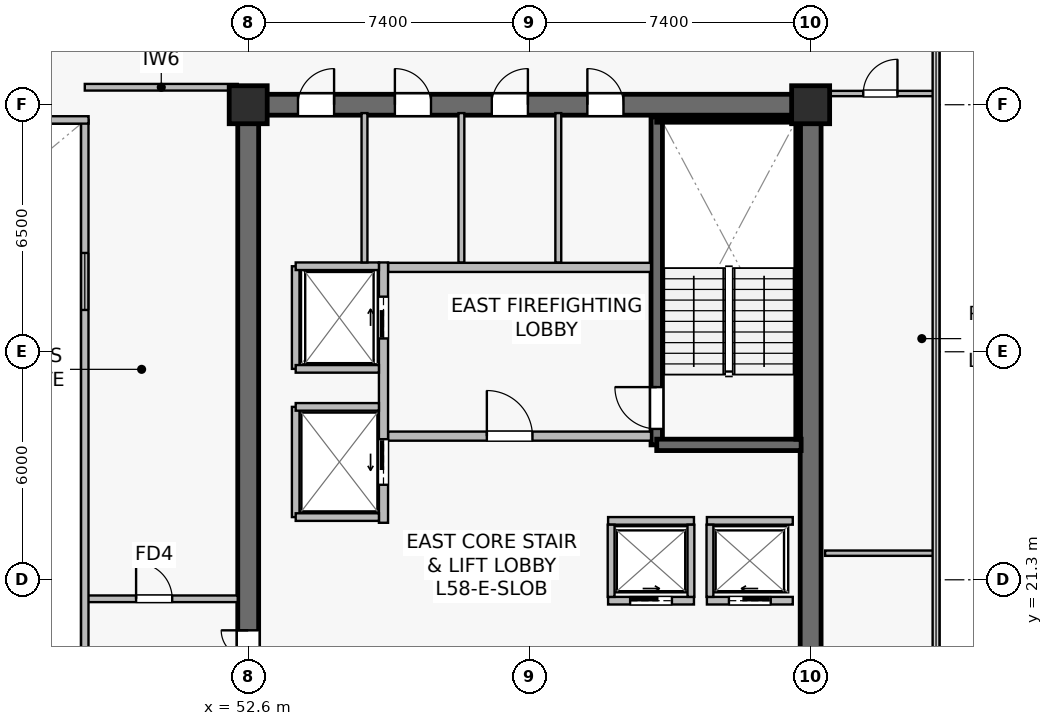
"""IFC4 building model, lengths in metres.
Left out: names, types, materials, properties, quantities, classifications, styles, units other than length and angle.
Written with IfcOpenShell. Run it as: python <this file> out.ifc"""

import sys

from ifc_helpers import new_model, si_unit, direction, frame, frame_2d, origin, origin_2d, place, context, subcontext, project, spatial, rectangle, extrude, source, transform, mapped, element, fill, save


model = new_model("IFC4")
c1 = context("Model", 3, precision=1e-05, world=origin(), true_north=direction((0.0, 1.0)))
c2 = subcontext(c1, "Body", "Model", "MODEL_VIEW")
j1 = project(units=[si_unit("LENGTHUNIT", "METRE"), si_unit("PLANEANGLEUNIT", "RADIAN")], contexts=[c1])
p1 = place(None, origin())
s1 = spatial("IfcSite", under=j1, at=p1, CompositionType="ELEMENT")
p2 = place(p1, origin())
s2 = spatial("IfcBuilding", under=s1, at=p2, CompositionType="ELEMENT")
p3 = place(p2, frame((0.0, 0.0, 242.4)))
s3 = spatial("IfcBuildingStorey", under=s2, at=p3, CompositionType="ELEMENT", Elevation=242.4)
p4 = place(p3, frame((52.325, 33.8, 0.0), z_axis=(0.0, 0.0, 1.0), x_axis=(1.0, 0.0, 0.0)))
e1 = element("IfcWall", 1, at=p4, inside=s3, PredefinedType="SHEAR", context=c2, shape_type="SweptSolid", body=[
    extrude(rectangle(XDim=15.35, YDim=0.55, at=frame_2d((7.675, 0.0))), origin(), (0.0, 0.0, 1.0), 3.8),
])
p5 = place(p4, frame((9.2, 0.0, 0.0)))
e2 = element("IfcOpeningElement", 2, at=p5, cuts=e1, PredefinedType="OPENING", context=c2, shape_type="SweptSolid", body=[
    extrude(rectangle(XDim=0.95, YDim=2.15, at=frame_2d((0.475, 1.075))), frame((0.0, 0.285, 0.0), z_axis=(0.0, -1.0, 0.0), x_axis=(1.0, 0.0, 0.0)), (0.0, 0.0, 1.0), 0.57),
])
p6 = place(p4, frame((6.685, 0.0, 0.0)))
e3 = element("IfcOpeningElement", 3, at=p6, cuts=e1, PredefinedType="OPENING", context=c2, shape_type="SweptSolid", body=[
    extrude(rectangle(XDim=0.95, YDim=2.15, at=frame_2d((0.475, 1.075))), frame((0.0, 0.285, 0.0), z_axis=(0.0, -1.0, 0.0), x_axis=(1.0, 0.0, 0.0)), (0.0, 0.0, 1.0), 0.57),
])
p7 = place(p4, frame((4.135, 0.0, 0.0)))
e4 = element("IfcOpeningElement", 4, at=p7, cuts=e1, PredefinedType="OPENING", context=c2, shape_type="SweptSolid", body=[
    extrude(rectangle(XDim=0.95, YDim=2.15, at=frame_2d((0.475, 1.075))), frame((0.0, 0.285, 0.0), z_axis=(0.0, -1.0, 0.0), x_axis=(1.0, 0.0, 0.0)), (0.0, 0.0, 1.0), 0.57),
])
p8 = place(p4, frame((1.585, 0.0, 0.0)))
e5 = element("IfcOpeningElement", 5, at=p8, cuts=e1, PredefinedType="OPENING", context=c2, shape_type="SweptSolid", body=[
    extrude(rectangle(XDim=0.95, YDim=2.15, at=frame_2d((0.475, 1.075))), frame((0.0, 0.285, 0.0), z_axis=(0.0, -1.0, 0.0), x_axis=(1.0, 0.0, 0.0)), (0.0, 0.0, 1.0), 0.57),
])
p9 = place(p3, frame((52.6, 15.075, 0.0), z_axis=(0.0, 0.0, 1.0), x_axis=(0.0, 1.0, 0.0)))
e6 = element("IfcWall", 6, at=p9, inside=s3, PredefinedType="SHEAR", context=c2, shape_type="SweptSolid", body=[
    extrude(rectangle(XDim=18.45, YDim=0.55, at=frame_2d((9.225, 0.0))), origin(), (0.0, 0.0, 1.0), 3.8),
])
p10 = place(p9, frame((3.475, 0.0, 0.0)))
e7 = element("IfcOpeningElement", 7, at=p10, cuts=e6, PredefinedType="OPENING", context=c2, shape_type="SweptSolid", body=[
    extrude(rectangle(XDim=1.42, YDim=2.2, at=frame_2d((0.71, 1.1))), frame((0.0, 0.285, 0.0), z_axis=(0.0, -1.0, 0.0), x_axis=(1.0, 0.0, 0.0)), (0.0, 0.0, 1.0), 0.57),
])
p11 = place(p3, frame((67.4, 15.075, 0.0), z_axis=(0.0, 0.0, 1.0), x_axis=(0.0, 1.0, 0.0)))
e8 = element("IfcWall", 8, at=p11, inside=s3, PredefinedType="SHEAR", context=c2, shape_type="SweptSolid", body=[
    extrude(rectangle(XDim=18.45, YDim=0.55, at=frame_2d((9.225, 0.0))), origin(), (0.0, 0.0, 1.0), 3.8),
])
p12 = place(p3, frame((63.35, 24.85, 0.0), z_axis=(0.0, 0.0, 1.0), x_axis=(0.0, 1.0, 0.0)))
e9 = element("IfcWall", 9, at=p12, inside=s3, PredefinedType="SHEAR", context=c2, shape_type="SweptSolid", body=[
    extrude(rectangle(XDim=8.63, YDim=0.3, at=frame_2d((4.315, 0.0))), origin(), (0.0, 0.0, 1.0), 3.8),
])
p13 = place(p12, frame((0.42, 0.0, 0.0)))
e10 = element("IfcOpeningElement", 10, at=p13, cuts=e9, PredefinedType="OPENING", context=c2, shape_type="SweptSolid", body=[
    extrude(rectangle(XDim=1.1, YDim=2.15, at=frame_2d((0.55, 1.075))), frame((0.0, 0.16, 0.0), z_axis=(0.0, -1.0, 0.0), x_axis=(1.0, 0.0, 0.0)), (0.0, 0.0, 1.0), 0.32),
])
p14 = place(p3, frame((63.35, 24.85, 0.0), z_axis=(0.0, 0.0, 1.0), x_axis=(1.0, 0.0, 0.0)))
e11 = element("IfcWall", 11, at=p14, inside=s3, PredefinedType="SHEAR", context=c2, shape_type="SweptSolid", body=[
    extrude(rectangle(XDim=3.8, YDim=0.3, at=frame_2d((1.9, 0.0))), origin(), (0.0, 0.0, 1.0), 3.8),
])
p15 = place(p3, frame((63.35, 33.4, 0.0), z_axis=(0.0, 0.0, 1.0), x_axis=(1.0, 0.0, 0.0)))
e12 = element("IfcWall", 12, at=p15, inside=s3, PredefinedType="SOLIDWALL", context=c2, shape_type="SweptSolid", body=[
    extrude(rectangle(XDim=3.72, YDim=0.12, at=frame_2d((1.86, 0.0))), origin(), (0.0, 0.0, 1.0), 3.8),
])
p16 = place(p3, frame((67.07, 25.0, 0.0), z_axis=(0.0, 0.0, 1.0), x_axis=(0.0, 1.0, 0.0)))
e13 = element("IfcWall", 13, at=p16, inside=s3, PredefinedType="SOLIDWALL", context=c2, shape_type="SweptSolid", body=[
    extrude(rectangle(XDim=8.32, YDim=0.12, at=frame_2d((4.16, 0.0))), origin(), (0.0, 0.0, 1.0), 3.8),
])
m1 = source(origin(), c2, "Body", "SweptSolid", [
    extrude(rectangle(XDim=1.0, YDim=1.0, at=origin_2d()), origin(), (0.0, 0.0, 1.0), 4.1),
])
for number, where, z_axis, x_axis in (
    (14, (52.6, 33.8, 0.0), (0.0, 0.0, 1.0), (1.0, 0.0, 0.0)),
    (15, (67.4, 33.8, 0.0), (0.0, 0.0, 1.0), (1.0, 0.0, 0.0)),
):
    element("IfcColumn", number, at=place(p3, frame(where, z_axis=z_axis, x_axis=x_axis)), inside=s3, PredefinedType="COLUMN", context=c2, shape_type="MappedRepresentation", body=[
        mapped(m1, transform((0.0, 0.0, 0.0), scale=1.0)),
    ])
p17 = place(p3, frame((56.28, 25.08, 0.0), z_axis=(0.0, 0.0, 1.0), x_axis=(1.0, 0.0, 0.0)))
e16 = element("IfcWall", 16, at=p17, inside=s3, PredefinedType="SOLIDWALL", context=c2, shape_type="SweptSolid", body=[
    extrude(rectangle(XDim=6.92, YDim=0.24, at=frame_2d((3.46, 0.0))), origin(), (0.0, 0.0, 1.0), 3.197),
])
p18 = place(p17, frame((2.6, 0.0, 0.0)))
e17 = element("IfcOpeningElement", 17, at=p18, cuts=e16, PredefinedType="OPENING", context=c2, shape_type="SweptSolid", body=[
    extrude(rectangle(XDim=1.2, YDim=2.16, at=frame_2d((0.6, 1.08))), frame((0.0, 0.13, 0.0), z_axis=(0.0, -1.0, 0.0), x_axis=(1.0, 0.0, 0.0)), (0.0, 0.0, 1.0), 0.26),
])
p19 = place(p3, frame((56.28, 29.52, 0.0), z_axis=(0.0, 0.0, 1.0), x_axis=(1.0, 0.0, 0.0)))
e18 = element("IfcWall", 18, at=p19, inside=s3, PredefinedType="SOLIDWALL", context=c2, shape_type="SweptSolid", body=[
    extrude(rectangle(XDim=6.92, YDim=0.24, at=frame_2d((3.46, 0.0))), origin(), (0.0, 0.0, 1.0), 3.197),
])
p20 = place(p3, frame((56.16, 22.8, 0.0), z_axis=(0.0, 0.0, 1.0), x_axis=(0.0, 1.0, 0.0)))
e19 = element("IfcWall", 19, at=p20, inside=s3, PredefinedType="SOLIDWALL", context=c2, shape_type="SweptSolid", body=[
    extrude(rectangle(XDim=6.85, YDim=0.24, at=frame_2d((3.425, 0.0))), origin(), (0.0, 0.0, 1.0), 2.935),
])
p21 = place(p20, frame((4.85, 0.0, 0.0)))
e20 = element("IfcOpeningElement", 20, at=p21, cuts=e19, PredefinedType="OPENING", context=c2, shape_type="SweptSolid", body=[
    extrude(rectangle(XDim=1.1, YDim=2.22, at=frame_2d((0.55, 1.11))), frame((0.0, 0.13, 0.0), z_axis=(0.0, -1.0, 0.0), x_axis=(1.0, 0.0, 0.0)), (0.0, 0.0, 1.0), 0.26),
])
p22 = place(p20, frame((1.0, 0.0, 0.0)))
e21 = element("IfcOpeningElement", 21, at=p22, cuts=e19, PredefinedType="OPENING", context=c2, shape_type="SweptSolid", body=[
    extrude(rectangle(XDim=1.2, YDim=2.22, at=frame_2d((0.6, 1.11))), frame((0.0, 0.13, 0.0), z_axis=(0.0, -1.0, 0.0), x_axis=(1.0, 0.0, 0.0)), (0.0, 0.0, 1.0), 0.26),
])
p23 = place(p3, frame((64.67, 20.75, 0.0), z_axis=(0.0, 0.0, 1.0), x_axis=(1.0, 0.0, 0.0)))
e22 = element("IfcWall", 22, at=p23, inside=s3, PredefinedType="SOLIDWALL", context=c2, shape_type="SweptSolid", body=[
    extrude(rectangle(XDim=2.26, YDim=0.2, at=frame_2d((1.13, 0.0))), origin(), (0.0, 0.0, 1.0), 3.8),
])
p24 = place(p23, frame((0.58, 0.0, 0.0)))
e23 = element("IfcOpeningElement", 23, at=p24, cuts=e22, PredefinedType="OPENING", context=c2, shape_type="SweptSolid", body=[
    extrude(rectangle(XDim=1.1, YDim=2.22, at=frame_2d((0.55, 1.11))), frame((0.0, 0.11, 0.0), z_axis=(0.0, -1.0, 0.0), x_axis=(1.0, 0.0, 0.0)), (0.0, 0.0, 1.0), 0.22),
])
p25 = place(p3, frame((64.67, 22.85, 0.0), z_axis=(0.0, 0.0, 1.0), x_axis=(1.0, 0.0, 0.0)))
e24 = element("IfcWall", 24, at=p25, inside=s3, PredefinedType="SOLIDWALL", context=c2, shape_type="SweptSolid", body=[
    extrude(rectangle(XDim=2.26, YDim=0.2, at=frame_2d((1.13, 0.0))), origin(), (0.0, 0.0, 1.0), 3.8),
])
p26 = place(p3, frame((64.75, 20.85, 0.0), z_axis=(0.0, 0.0, 1.0), x_axis=(0.0, 1.0, 0.0)))
e25 = element("IfcWall", 25, at=p26, inside=s3, PredefinedType="SOLIDWALL", context=c2, shape_type="SweptSolid", body=[
    extrude(rectangle(XDim=1.9, YDim=0.18, at=frame_2d((0.95, 0.0))), origin(), (0.0, 0.0, 1.0), 3.8),
])
p27 = place(p3, frame((62.07, 20.75, 0.0), z_axis=(0.0, 0.0, 1.0), x_axis=(1.0, 0.0, 0.0)))
e26 = element("IfcWall", 26, at=p27, inside=s3, PredefinedType="SOLIDWALL", context=c2, shape_type="SweptSolid", body=[
    extrude(rectangle(XDim=2.26, YDim=0.2, at=frame_2d((1.13, 0.0))), origin(), (0.0, 0.0, 1.0), 3.8),
])
p28 = place(p27, frame((0.58, 0.0, 0.0)))
e27 = element("IfcOpeningElement", 27, at=p28, cuts=e26, PredefinedType="OPENING", context=c2, shape_type="SweptSolid", body=[
    extrude(rectangle(XDim=1.1, YDim=2.22, at=frame_2d((0.55, 1.11))), frame((0.0, 0.11, 0.0), z_axis=(0.0, -1.0, 0.0), x_axis=(1.0, 0.0, 0.0)), (0.0, 0.0, 1.0), 0.22),
])
p29 = place(p3, frame((62.07, 22.85, 0.0), z_axis=(0.0, 0.0, 1.0), x_axis=(1.0, 0.0, 0.0)))
e28 = element("IfcWall", 28, at=p29, inside=s3, PredefinedType="SOLIDWALL", context=c2, shape_type="SweptSolid", body=[
    extrude(rectangle(XDim=2.26, YDim=0.2, at=frame_2d((1.13, 0.0))), origin(), (0.0, 0.0, 1.0), 3.8),
])
for number, where, z_axis, x_axis in (
    (29, (62.15, 20.85, 0.0), (0.0, 0.0, 1.0), (0.0, 1.0, 0.0)),
    (30, (64.25, 20.85, 0.0), (0.0, 0.0, 1.0), (0.0, 1.0, 0.0)),
):
    element("IfcWall", number, at=place(p3, frame(where, z_axis=z_axis, x_axis=x_axis)), inside=s3, PredefinedType="SOLIDWALL", context=c2, shape_type="SweptSolid", body=[
        extrude(rectangle(XDim=1.9, YDim=0.18, at=frame_2d((0.95, 0.0))), origin(), (0.0, 0.0, 1.0), 3.8),
    ])
p30 = place(p3, frame((53.85, 26.85, 0.0), z_axis=(0.0, 0.0, 1.0), x_axis=(0.0, 1.0, 0.0)))
e31 = element("IfcWall", 31, at=p30, inside=s3, PredefinedType="SOLIDWALL", context=c2, shape_type="SweptSolid", body=[
    extrude(rectangle(XDim=2.7, YDim=0.2, at=frame_2d((1.35, 0.0))), origin(), (0.0, 0.0, 1.0), 3.8),
])
p31 = place(p3, frame((53.85, 29.55, 0.0), z_axis=(0.0, 0.0, 1.0), x_axis=(1.0, 0.0, 0.0)))
e32 = element("IfcWall", 32, at=p31, inside=s3, PredefinedType="SOLIDWALL", context=c2, shape_type="SweptSolid", body=[
    extrude(rectangle(XDim=2.19, YDim=0.2, at=frame_2d((1.095, 0.0))), origin(), (0.0, 0.0, 1.0), 3.8),
])
p32 = place(p3, frame((53.85, 26.85, 0.0), z_axis=(0.0, 0.0, 1.0), x_axis=(1.0, 0.0, 0.0)))
e33 = element("IfcWall", 33, at=p32, inside=s3, PredefinedType="SOLIDWALL", context=c2, shape_type="SweptSolid", body=[
    extrude(rectangle(XDim=2.19, YDim=0.2, at=frame_2d((1.095, 0.0))), origin(), (0.0, 0.0, 1.0), 3.197),
])
p33 = place(p3, frame((53.85, 22.95, 0.0), z_axis=(0.0, 0.0, 1.0), x_axis=(0.0, 1.0, 0.0)))
e34 = element("IfcWall", 34, at=p33, inside=s3, PredefinedType="SOLIDWALL", context=c2, shape_type="SweptSolid", body=[
    extrude(rectangle(XDim=2.9, YDim=0.2, at=frame_2d((1.45, 0.0))), origin(), (0.0, 0.0, 1.0), 2.935),
])
for number, where, z_axis, x_axis in (
    (35, (53.85, 25.85, 0.0), (0.0, 0.0, 1.0), (1.0, 0.0, 0.0)),
    (36, (53.85, 22.95, 0.0), (0.0, 0.0, 1.0), (1.0, 0.0, 0.0)),
):
    element("IfcWall", number, at=place(p3, frame(where, z_axis=z_axis, x_axis=x_axis)), inside=s3, PredefinedType="SOLIDWALL", context=c2, shape_type="SweptSolid", body=[
        extrude(rectangle(XDim=2.19, YDim=0.2, at=frame_2d((1.095, 0.0))), origin(), (0.0, 0.0, 1.0), 3.8),
    ])
for number, where, z_axis, x_axis in (
    (37, (60.76, 29.65, 0.0), (0.0, 0.0, 1.0), (0.0, 1.0, 0.0)),
    (38, (58.21, 29.65, 0.0), (0.0, 0.0, 1.0), (0.0, 1.0, 0.0)),
    (39, (55.66, 29.65, 0.0), (0.0, 0.0, 1.0), (0.0, 1.0, 0.0)),
):
    element("IfcWall", number, at=place(p3, frame(where, z_axis=z_axis, x_axis=x_axis)), inside=s3, PredefinedType="PLUMBINGWALL", context=c2, shape_type="SweptSolid", body=[
        extrude(rectangle(XDim=3.93, YDim=0.155, at=frame_2d((1.965, 0.0))), origin(), (0.0, 0.0, 1.0), 3.8),
    ])
p34 = place(p3, frame((48.3, 34.26, 0.0), z_axis=(0.0, 0.0, 1.0), x_axis=(1.0, 0.0, 0.0)))
e40 = element("IfcWall", 40, at=p34, inside=s3, PredefinedType="PARTITIONING", context=c2, shape_type="SweptSolid", body=[
    extrude(rectangle(XDim=4.025, YDim=0.175, at=frame_2d((2.012, 0.0))), origin(), (0.0, 0.0, 1.0), 3.485),
])
p35 = place(p3, frame((48.3, 20.8, 0.0), z_axis=(0.0, 0.0, 1.0), x_axis=(1.0, 0.0, 0.0)))
e41 = element("IfcWall", 41, at=p35, inside=s3, PredefinedType="PARTITIONING", context=c2, shape_type="SweptSolid", body=[
    extrude(rectangle(XDim=4.025, YDim=0.175, at=frame_2d((2.012, 0.0))), origin(), (0.0, 0.0, 1.0), 3.8),
])
p36 = place(p35, frame((1.35, 0.0, 0.0)))
e42 = element("IfcOpeningElement", 42, at=p36, cuts=e41, PredefinedType="OPENING", context=c2, shape_type="SweptSolid", body=[
    extrude(rectangle(XDim=0.95, YDim=2.15, at=frame_2d((0.475, 1.075))), frame((0.0, 0.098, 0.0), z_axis=(0.0, -1.0, 0.0), x_axis=(1.0, 0.0, 0.0)), (0.0, 0.0, 1.0), 0.195),
])
p37 = place(p3, frame((48.3, 15.2, 0.0), z_axis=(0.0, 0.0, 1.0), x_axis=(0.0, 1.0, 0.0)))
e43 = element("IfcWall", 43, at=p37, inside=s3, PredefinedType="SOLIDWALL", context=c2, shape_type="SweptSolid", body=[
    extrude(rectangle(XDim=18.2, YDim=0.195, at=frame_2d((9.1, 0.0))), origin(), (0.0, 0.0, 1.0), 3.8),
])
p38 = place(p37, frame((1.8, 0.0, 0.9)))
e44 = element("IfcOpeningElement", 44, at=p38, cuts=e43, PredefinedType="OPENING", context=c2, shape_type="SweptSolid", body=[
    extrude(rectangle(XDim=1.5, YDim=1.4, at=frame_2d((0.75, 0.7))), frame((0.0, 0.107, 0.0), z_axis=(0.0, -1.0, 0.0), x_axis=(1.0, 0.0, 0.0)), (0.0, 0.0, 1.0), 0.215),
])
p39 = place(p37, frame((13.2, 0.0, 0.9)))
e45 = element("IfcOpeningElement", 45, at=p39, cuts=e43, PredefinedType="OPENING", context=c2, shape_type="SweptSolid", body=[
    extrude(rectangle(XDim=1.5, YDim=1.4, at=frame_2d((0.75, 0.7))), frame((0.0, 0.107, 0.0), z_axis=(0.0, -1.0, 0.0), x_axis=(1.0, 0.0, 0.0)), (0.0, 0.0, 1.0), 0.215),
])
p40 = place(p3, frame((26.4, 33.4, 0.0), z_axis=(0.0, 0.0, 1.0), x_axis=(1.0, 0.0, 0.0)))
e46 = element("IfcWall", 46, at=p40, inside=s3, PredefinedType="SOLIDWALL", context=c2, shape_type="SweptSolid", body=[
    extrude(rectangle(XDim=22.0, YDim=0.195, at=frame_2d((11.0, 0.0))), origin(), (0.0, 0.0, 1.0), 3.8),
])
p41 = place(p3, frame((67.78, 22.0, 0.0), z_axis=(0.0, 0.0, 1.0), x_axis=(1.0, 0.0, 0.0)))
e47 = element("IfcWall", 47, at=p41, inside=s3, PredefinedType="PARTITIONING", context=c2, shape_type="SweptSolid", body=[
    extrude(rectangle(XDim=2.91, YDim=0.14, at=frame_2d((1.455, 0.0))), origin(), (0.0, 0.0, 1.0), 3.8),
])
p42 = place(p3, frame((67.78, 34.095, 0.0), z_axis=(0.0, 0.0, 1.0), x_axis=(1.0, 0.0, 0.0)))
e48 = element("IfcWall", 48, at=p42, inside=s3, PredefinedType="PARTITIONING", context=c2, shape_type="SweptSolid", body=[
    extrude(rectangle(XDim=2.91, YDim=0.14, at=frame_2d((1.455, 0.0))), origin(), (0.0, 0.0, 1.0), 3.8),
])
p43 = place(p42, frame((1.005, 0.0, 0.0)))
e49 = element("IfcOpeningElement", 49, at=p43, cuts=e48, PredefinedType="OPENING", context=c2, shape_type="SweptSolid", body=[
    extrude(rectangle(XDim=0.9, YDim=2.1, at=frame_2d((0.45, 1.05))), frame((0.0, 0.08, 0.0), z_axis=(0.0, -1.0, 0.0), x_axis=(1.0, 0.0, 0.0)), (0.0, 0.0, 1.0), 0.16),
])
m2 = source(origin(), c2, "Body", "SweptSolid", [
    extrude(rectangle(XDim=1.5, YDim=1.4, at=frame_2d((0.75, 0.7))), frame((0.0, 0.03, 0.0), z_axis=(0.0, -1.0, 0.0), x_axis=(1.0, 0.0, 0.0)), (0.0, 0.0, 1.0), 0.06),
])
p44 = place(p39, origin())
e50 = element("IfcWindow", 50, at=p44, inside=s3, PartitioningType="SINGLE_PANEL", PredefinedType="WINDOW", context=c2, shape_type="MappedRepresentation", body=[
    mapped(m2, transform((0.0, 0.0, 0.0), scale=1.0)),
])
fill(e45, e50)
m3 = source(origin(), c2, "Body", "SweptSolid", [
    extrude(rectangle(XDim=1.1, YDim=2.15, at=frame_2d((0.55, 1.075))), frame((0.0, 0.025, 0.0), z_axis=(0.0, -1.0, 0.0), x_axis=(1.0, 0.0, 0.0)), (0.0, 0.0, 1.0), 0.05),
])
p45 = place(p13, origin())
e51 = element("IfcDoor", 51, at=p45, inside=s3, OperationType="SINGLE_SWING_RIGHT", PredefinedType="DOOR", context=c2, shape_type="MappedRepresentation", body=[
    mapped(m3, transform((0.0, 0.0, 0.0), scale=1.0)),
])
fill(e10, e51)
m4 = source(origin(), c2, "Body", "SweptSolid", [
    extrude(rectangle(XDim=1.2, YDim=2.16, at=frame_2d((0.6, 1.08))), frame((0.0, 0.025, 0.0), z_axis=(0.0, -1.0, 0.0), x_axis=(1.0, 0.0, 0.0)), (0.0, 0.0, 1.0), 0.05),
])
p46 = place(p18, origin())
e52 = element("IfcDoor", 52, at=p46, inside=s3, OperationType="SINGLE_SWING_LEFT", PredefinedType="DOOR", context=c2, shape_type="MappedRepresentation", body=[
    mapped(m4, transform((0.0, 0.0, 0.0), scale=1.0)),
])
fill(e17, e52)
m5 = source(origin(), c2, "Body", "SweptSolid", [
    extrude(rectangle(XDim=1.1, YDim=2.22, at=frame_2d((0.55, 1.11))), frame((0.0, 0.025, 0.0), z_axis=(0.0, -1.0, 0.0), x_axis=(1.0, 0.0, 0.0)), (0.0, 0.0, 1.0), 0.05),
])
p47 = place(p24, origin())
e53 = element("IfcDoor", 53, at=p47, inside=s3, OperationType="SLIDING_TO_LEFT", PredefinedType="USERDEFINED", context=c2, shape_type="MappedRepresentation", body=[
    mapped(m5, transform((0.0, 0.0, 0.0), scale=1.0)),
])
fill(e23, e53)
p48 = place(p28, origin())
e54 = element("IfcDoor", 54, at=p48, inside=s3, OperationType="SLIDING_TO_RIGHT", PredefinedType="USERDEFINED", context=c2, shape_type="MappedRepresentation", body=[
    mapped(m5, transform((0.0, 0.0, 0.0), scale=1.0)),
])
fill(e27, e54)
p49 = place(p21, origin())
e55 = element("IfcDoor", 55, at=p49, inside=s3, OperationType="SLIDING_TO_RIGHT", PredefinedType="USERDEFINED", context=c2, shape_type="MappedRepresentation", body=[
    mapped(m5, transform((0.0, 0.0, 0.0), scale=1.0)),
])
fill(e20, e55)
m6 = source(origin(), c2, "Body", "SweptSolid", [
    extrude(rectangle(XDim=1.2, YDim=2.22, at=frame_2d((0.6, 1.11))), frame((0.0, 0.025, 0.0), z_axis=(0.0, -1.0, 0.0), x_axis=(1.0, 0.0, 0.0)), (0.0, 0.0, 1.0), 0.05),
])
p50 = place(p22, origin())
e56 = element("IfcDoor", 56, at=p50, inside=s3, OperationType="SLIDING_TO_LEFT", PredefinedType="USERDEFINED", context=c2, shape_type="MappedRepresentation", body=[
    mapped(m6, transform((0.0, 0.0, 0.0), scale=1.0)),
])
fill(e21, e56)
m7 = source(origin(), c2, "Body", "SweptSolid", [
    extrude(rectangle(XDim=1.42, YDim=2.2, at=frame_2d((0.71, 1.1))), frame((0.0, 0.025, 0.0), z_axis=(0.0, -1.0, 0.0), x_axis=(1.0, 0.0, 0.0)), (0.0, 0.0, 1.0), 0.05),
])
p51 = place(p10, origin())
e57 = element("IfcDoor", 57, at=p51, inside=s3, OperationType="DOUBLE_DOOR_SINGLE_SWING", PredefinedType="DOOR", context=c2, shape_type="MappedRepresentation", body=[
    mapped(m7, transform((0.0, 0.0, 0.0), scale=1.0)),
])
fill(e7, e57)
m8 = source(origin(), c2, "Body", "SweptSolid", [
    extrude(rectangle(XDim=0.95, YDim=2.15, at=frame_2d((0.475, 1.075))), frame((0.0, 0.025, 0.0), z_axis=(0.0, -1.0, 0.0), x_axis=(1.0, 0.0, 0.0)), (0.0, 0.0, 1.0), 0.05),
])
p52 = place(p5, origin())
e58 = element("IfcDoor", 58, at=p52, inside=s3, OperationType="SINGLE_SWING_LEFT", PredefinedType="DOOR", context=c2, shape_type="MappedRepresentation", body=[
    mapped(m8, transform((0.0, 0.0, 0.0), scale=1.0)),
])
fill(e2, e58)
p53 = place(p6, origin())
e59 = element("IfcDoor", 59, at=p53, inside=s3, OperationType="SINGLE_SWING_RIGHT", PredefinedType="DOOR", context=c2, shape_type="MappedRepresentation", body=[
    mapped(m8, transform((0.0, 0.0, 0.0), scale=1.0)),
])
fill(e3, e59)
p54 = place(p7, origin())
e60 = element("IfcDoor", 60, at=p54, inside=s3, OperationType="SINGLE_SWING_LEFT", PredefinedType="DOOR", context=c2, shape_type="MappedRepresentation", body=[
    mapped(m8, transform((0.0, 0.0, 0.0), scale=1.0)),
])
fill(e4, e60)
p55 = place(p8, origin())
e61 = element("IfcDoor", 61, at=p55, inside=s3, OperationType="SINGLE_SWING_RIGHT", PredefinedType="DOOR", context=c2, shape_type="MappedRepresentation", body=[
    mapped(m8, transform((0.0, 0.0, 0.0), scale=1.0)),
])
fill(e5, e61)
p56 = place(p36, origin())
e62 = element("IfcDoor", 62, at=p56, inside=s3, OperationType="SINGLE_SWING_LEFT", PredefinedType="DOOR", context=c2, shape_type="MappedRepresentation", body=[
    mapped(m8, transform((0.0, 0.0, 0.0), scale=1.0)),
])
fill(e42, e62)
m9 = source(origin(), c2, "Body", "SweptSolid", [
    extrude(rectangle(XDim=0.9, YDim=2.1, at=frame_2d((0.45, 1.05))), frame((0.0, 0.025, 0.0), z_axis=(0.0, -1.0, 0.0), x_axis=(1.0, 0.0, 0.0)), (0.0, 0.0, 1.0), 0.05),
])
p57 = place(p43, origin())
e63 = element("IfcDoor", 63, at=p57, inside=s3, OperationType="SINGLE_SWING_RIGHT", PredefinedType="DOOR", context=c2, shape_type="MappedRepresentation", body=[
    mapped(m9, transform((0.0, 0.0, 0.0), scale=1.0)),
])
fill(e49, e63)
save(model, sys.argv[1])
